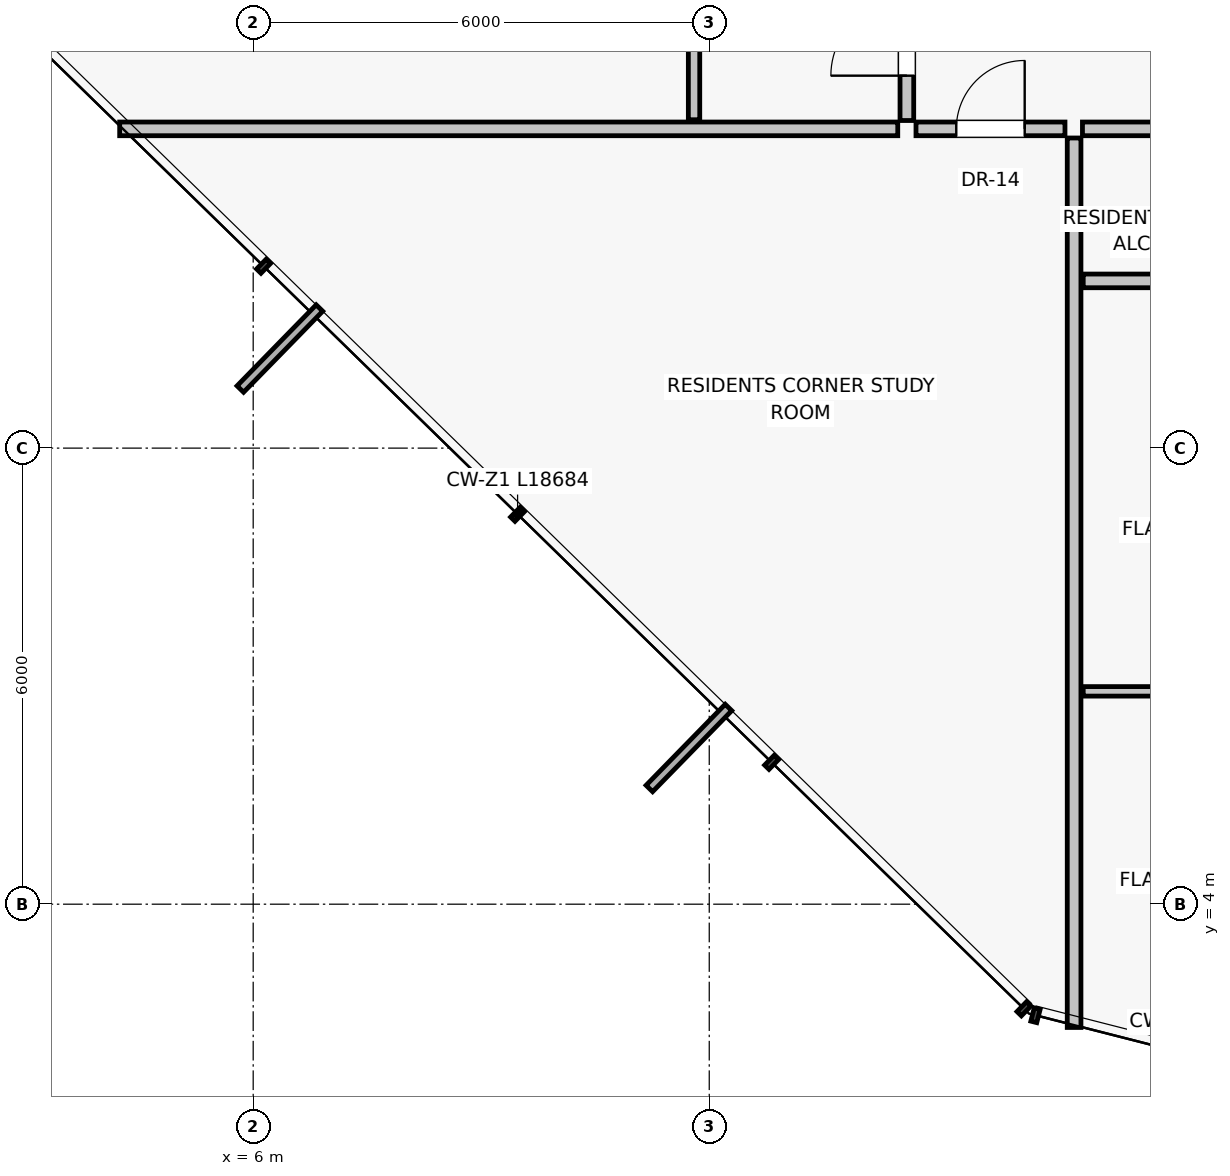
"""IFC4 building model, lengths in metres.
Left out: names, types, materials, properties, quantities, classifications, styles, units other than length and angle.
Written with IfcOpenShell. Run it as: python <this file> out.ifc"""

import sys

from ifc_helpers import new_model, si_unit, direction, frame, frame_2d, origin, place, context, subcontext, project, spatial, rectangle, extrude, source, transform, mapped, element, fill, save


model = new_model("IFC4")
c1 = context("Model", 3, precision=1e-05, world=origin(), true_north=direction((0.0, 1.0)))
c2 = subcontext(c1, "Body", "Model", "MODEL_VIEW")
j1 = project(units=[si_unit("LENGTHUNIT", "METRE"), si_unit("PLANEANGLEUNIT", "RADIAN")], contexts=[c1])
p1 = place(None, origin())
s1 = spatial("IfcSite", under=j1, at=p1, CompositionType="ELEMENT")
p2 = place(p1, origin())
s2 = spatial("IfcBuilding", under=s1, at=p2, CompositionType="ELEMENT")
p3 = place(p2, frame((0.0, 0.0, 77.1)))
s3 = spatial("IfcBuildingStorey", under=s2, at=p3, CompositionType="ELEMENT", Elevation=77.1)
p4 = place(p3, frame((16.8, 14.08, 0.0), z_axis=(0.0, 0.0, 1.0), x_axis=(0.0, -1.0, 0.0)))
e1 = element("IfcWall", 1, at=p4, inside=s3, PredefinedType="PARTITIONING", context=c2, shape_type="SweptSolid", body=[
    extrude(rectangle(XDim=11.702, YDim=0.18, at=frame_2d((5.851, 0.0))), origin(), (0.0, 0.0, 1.0), 2.93),
])
p5 = place(p3, frame((16.91, 14.2, 0.0), z_axis=(0.0, 0.0, 1.0), x_axis=(1.0, 0.0, 0.0)))
e2 = element("IfcWall", 2, at=p5, inside=s3, PredefinedType="PARTITIONING", context=c2, shape_type="SweptSolid", body=[
    extrude(rectangle(XDim=4.1, YDim=0.18, at=frame_2d((2.05, 0.0))), origin(), (0.0, 0.0, 1.0), 2.93),
])
p6 = place(p5, frame((1.55, 0.0, 0.0)))
e3 = element("IfcOpeningElement", 3, at=p6, cuts=e2, PredefinedType="OPENING", context=c2, shape_type="SweptSolid", body=[
    extrude(rectangle(XDim=1.0, YDim=2.01, at=frame_2d((0.5, 1.005))), frame((0.0, 0.1, 0.0), z_axis=(0.0, -1.0, 0.0), x_axis=(1.0, 0.0, 0.0)), (0.0, 0.0, 1.0), 0.2),
])
p7 = place(p3, frame((16.92, 6.8, 0.0), z_axis=(0.0, 0.0, 1.0), x_axis=(1.0, 0.0, 0.0)))
e4 = element("IfcWall", 4, at=p7, inside=s3, PredefinedType="PARTITIONING", context=c2, shape_type="SweptSolid", body=[
    extrude(rectangle(XDim=4.1, YDim=0.125, at=frame_2d((2.05, 0.0))), origin(), (0.0, 0.0, 1.0), 2.08),
])
p8 = place(p3, frame((16.92, 12.2, 0.0), z_axis=(0.0, 0.0, 1.0), x_axis=(1.0, 0.0, 0.0)))
e5 = element("IfcWall", 5, at=p8, inside=s3, PredefinedType="PARTITIONING", context=c2, shape_type="SweptSolid", body=[
    extrude(rectangle(XDim=4.1, YDim=0.18, at=frame_2d((2.05, 0.0))), origin(), (0.0, 0.0, 1.0), 2.93),
])
p9 = place(p3, frame((14.48, 14.2, 0.0), z_axis=(0.0, 0.0, 1.0), x_axis=(-1.0, 0.0, 0.0)))
e6 = element("IfcWall", 6, at=p9, inside=s3, PredefinedType="PARTITIONING", context=c2, shape_type="SweptSolid", body=[
    extrude(rectangle(XDim=10.237, YDim=0.18, at=frame_2d((5.118, 0.0))), origin(), (0.0, 0.0, 1.0), 2.93),
])
p10 = place(p3, frame((14.6, 14.31, 0.0), z_axis=(0.0, 0.0, 1.0), x_axis=(0.0, 1.0, 0.0)))
e7 = element("IfcWall", 7, at=p10, inside=s3, PredefinedType="PARTITIONING", context=c2, shape_type="SweptSolid", body=[
    extrude(rectangle(XDim=2.18, YDim=0.18, at=frame_2d((1.09, 0.0))), origin(), (0.0, 0.0, 1.0), 2.93),
])
p11 = place(p10, frame((0.59, 0.0, 0.0)))
e8 = element("IfcOpeningElement", 8, at=p11, cuts=e7, PredefinedType="OPENING", context=c2, shape_type="SweptSolid", body=[
    extrude(rectangle(XDim=1.0, YDim=2.01, at=frame_2d((0.5, 1.005))), frame((0.0, 0.1, 0.0), z_axis=(0.0, -1.0, 0.0), x_axis=(1.0, 0.0, 0.0)), (0.0, 0.0, 1.0), 0.2),
])
p12 = place(p3, frame((11.8, 14.32, 0.0), z_axis=(0.0, 0.0, 1.0), x_axis=(0.0, 1.0, 0.0)))
e9 = element("IfcWall", 9, at=p12, inside=s3, PredefinedType="PARTITIONING", context=c2, shape_type="SweptSolid", body=[
    extrude(rectangle(XDim=2.2, YDim=0.15, at=frame_2d((1.1, 0.0))), origin(), (0.0, 0.0, 1.0), 2.93),
])
p13 = place(p3, frame((14.72, 14.2, 0.0), z_axis=(0.0, 0.0, 1.0), x_axis=(1.0, 0.0, 0.0)))
e10 = element("IfcWall", 10, at=p13, inside=s3, PredefinedType="PARTITIONING", context=c2, shape_type="SweptSolid", body=[
    extrude(rectangle(XDim=1.96, YDim=0.18, at=frame_2d((0.98, 0.0))), origin(), (0.0, 0.0, 1.0), 2.93),
])
p14 = place(p13, frame((0.53, 0.0, 0.0)))
e11 = element("IfcOpeningElement", 11, at=p14, cuts=e10, PredefinedType="OPENING", context=c2, shape_type="SweptSolid", body=[
    extrude(rectangle(XDim=0.9, YDim=2.01, at=frame_2d((0.45, 1.005))), frame((0.0, 0.1, 0.0), z_axis=(0.0, -1.0, 0.0), x_axis=(1.0, 0.0, 0.0)), (0.0, 0.0, 1.0), 0.2),
])
m1 = source(origin(), c2, "Body", "SweptSolid", [
    extrude(rectangle(XDim=1.0, YDim=2.01, at=frame_2d((0.5, 1.005))), frame((0.0, 0.025, 0.0), z_axis=(0.0, -1.0, 0.0), x_axis=(1.0, 0.0, 0.0)), (0.0, 0.0, 1.0), 0.05),
])
p15 = place(p11, origin())
e12 = element("IfcDoor", 12, at=p15, inside=s3, OperationType="SINGLE_SWING_LEFT", PredefinedType="DOOR", context=c2, shape_type="MappedRepresentation", body=[
    mapped(m1, transform((0.0, 0.0, 0.0), scale=1.0)),
])
fill(e8, e12)
m2 = source(origin(), c2, "Body", "SweptSolid", [
    extrude(rectangle(XDim=0.9, YDim=2.01, at=frame_2d((0.45, 1.005))), frame((0.0, 0.025, 0.0), z_axis=(0.0, -1.0, 0.0), x_axis=(1.0, 0.0, 0.0)), (0.0, 0.0, 1.0), 0.05),
])
p16 = place(p14, origin())
e13 = element("IfcDoor", 13, at=p16, inside=s3, OperationType="SINGLE_SWING_RIGHT", PredefinedType="DOOR", context=c2, shape_type="MappedRepresentation", body=[
    mapped(m2, transform((0.0, 0.0, 0.0), scale=1.0)),
])
fill(e11, e13)
save(model, sys.argv[1])
